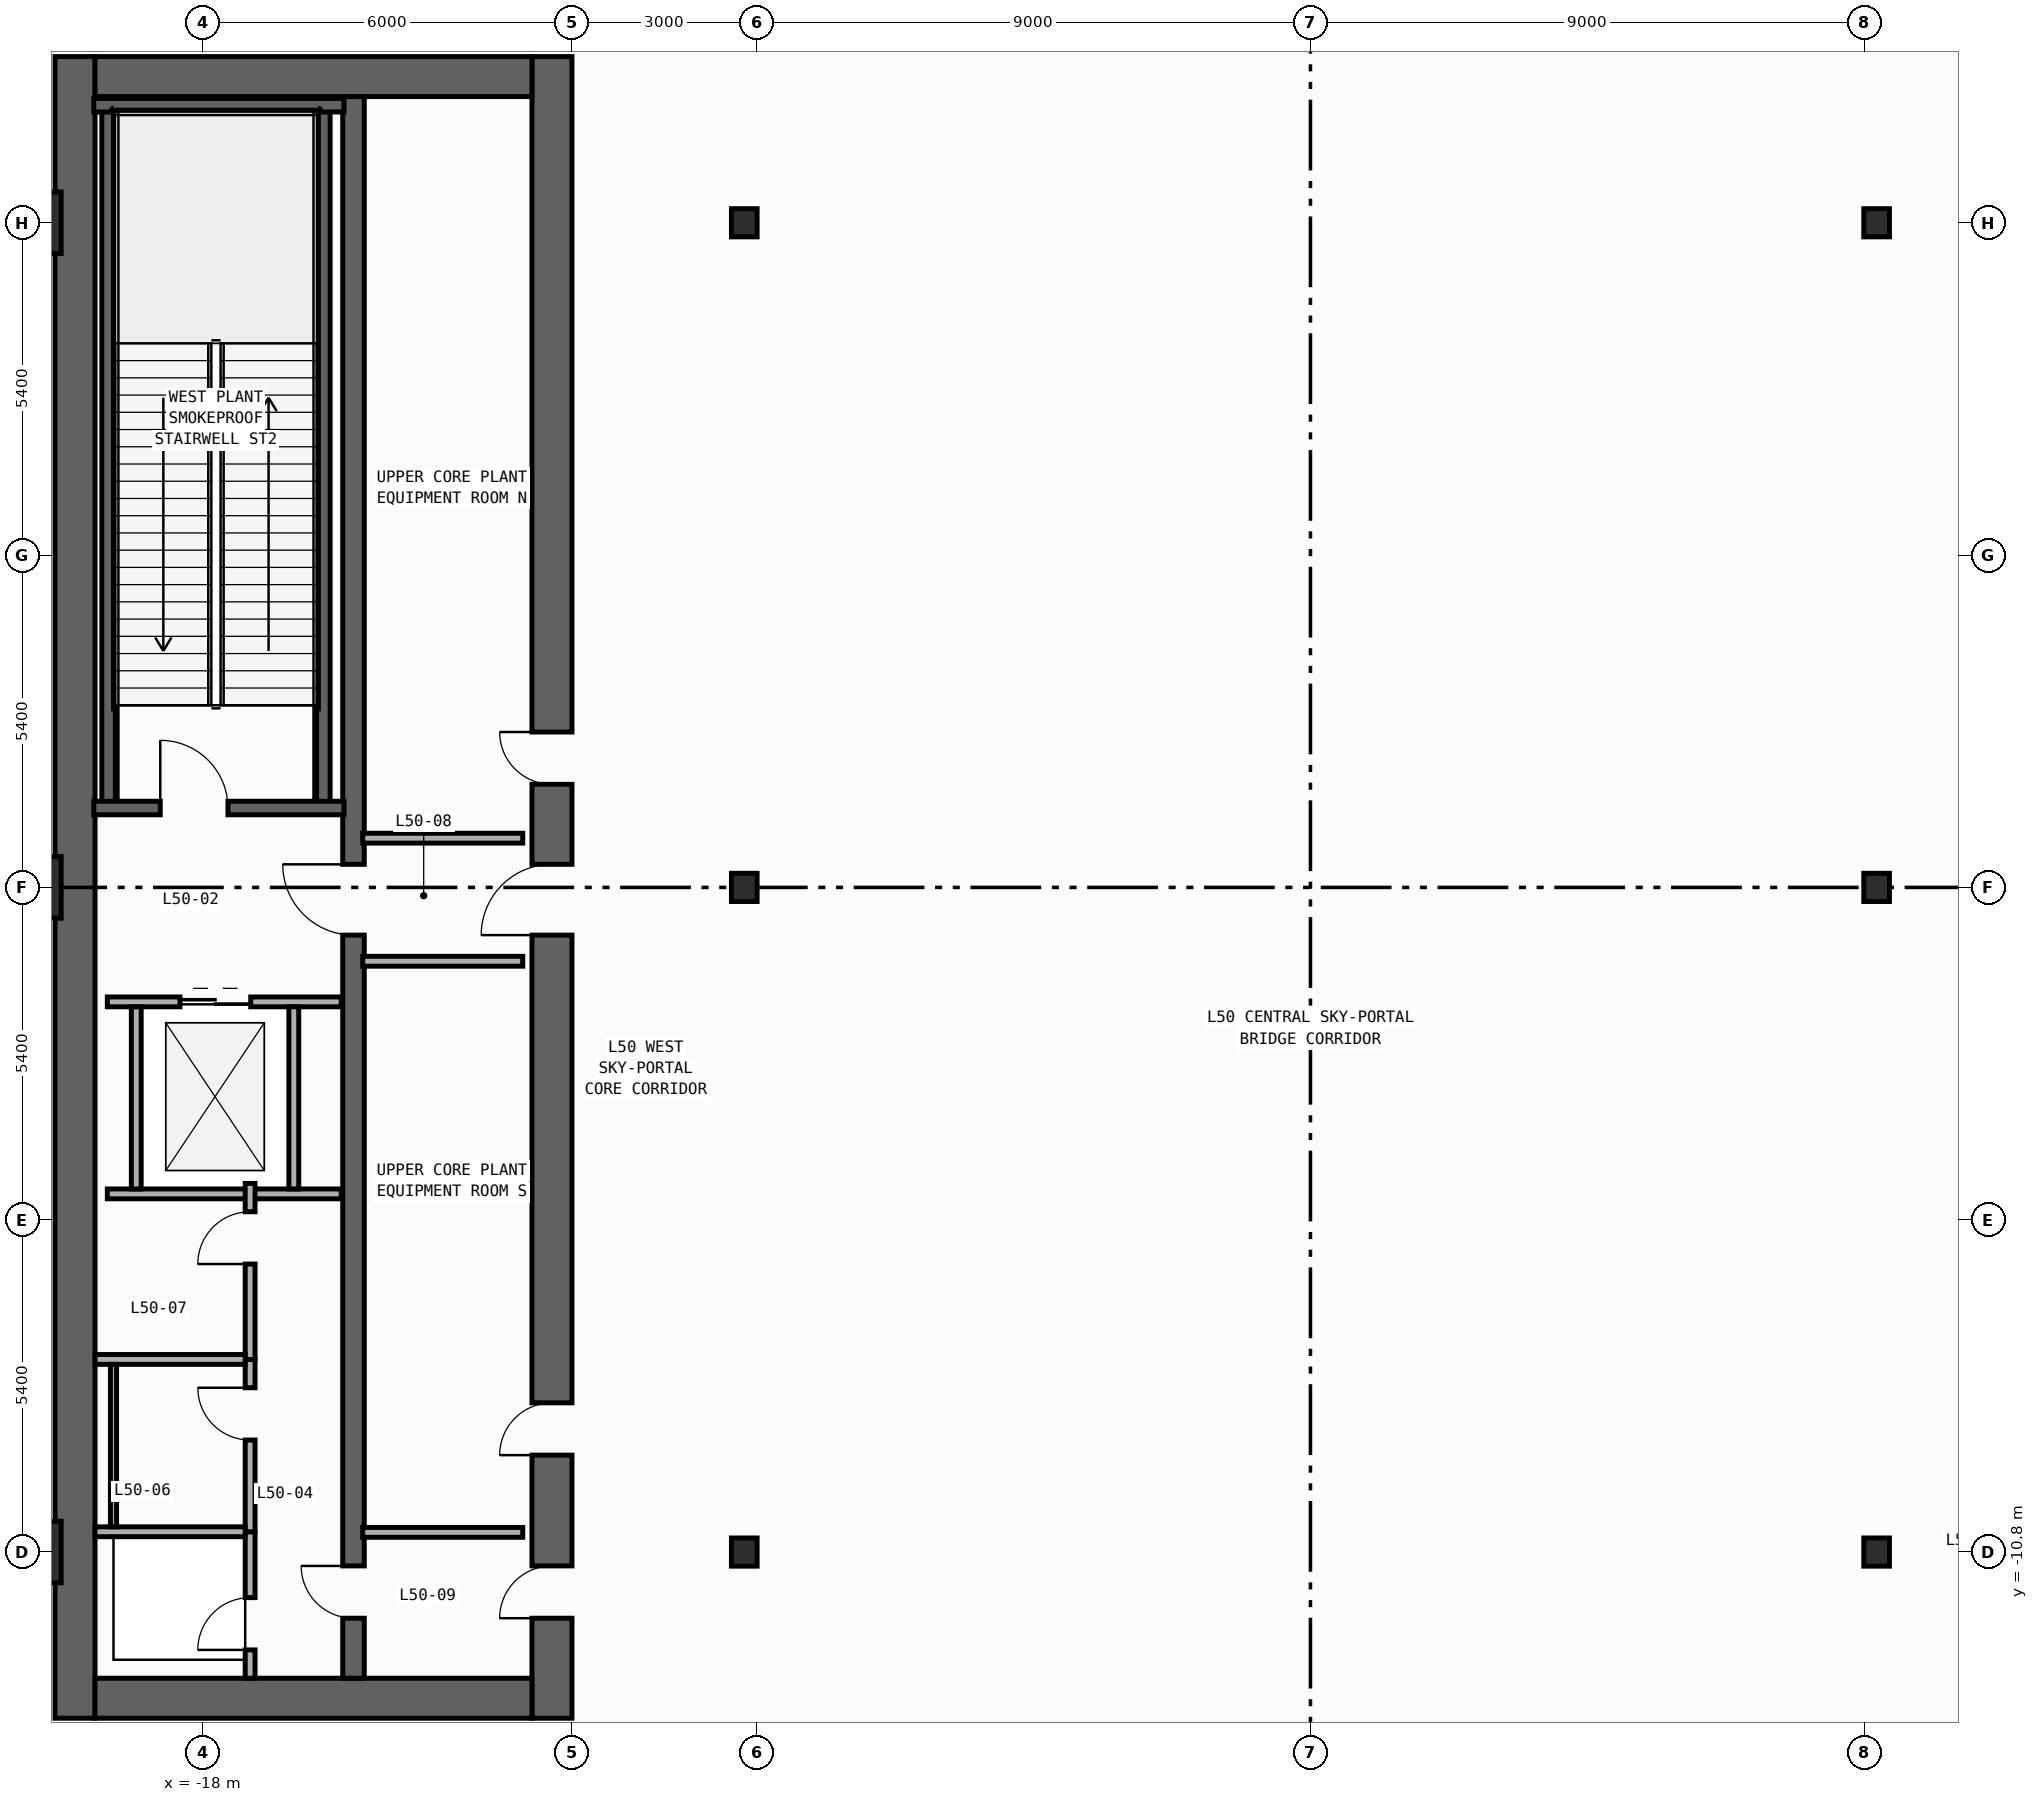
"""IFC4 building model, lengths in metres.
Left out: names, types, materials, properties, quantities, classifications, styles, units other than length and angle.
Written with IfcOpenShell. Run it as: python <this file> out.ifc"""

import sys

from ifc_helpers import new_model, si_unit, direction, frame, frame_2d, origin, origin_2d, place, context, subcontext, project, spatial, rectangle, i_section, extrude, element, fill, save


model = new_model("IFC4")
c1 = context("Model", 3, precision=1e-05, world=origin(), true_north=direction((0.0, 1.0)))
c2 = subcontext(c1, "Body", "Model", "MODEL_VIEW")
j1 = project(units=[si_unit("LENGTHUNIT", "METRE"), si_unit("PLANEANGLEUNIT", "RADIAN")], contexts=[c1])
p1 = place(None, origin())
s1 = spatial("IfcSite", under=j1, at=p1, CompositionType="ELEMENT")
p2 = place(p1, origin())
s2 = spatial("IfcBuilding", under=s1, at=p2, CompositionType="ELEMENT")
p3 = place(p2, frame((0.0, 0.0, 214.4)))
s3 = spatial("IfcBuildingStorey", under=s2, at=p3, CompositionType="ELEMENT", Elevation=214.4)
p4 = place(p3, frame((-20.075, -13.5, 0.0), z_axis=(0.0, 0.0, 1.0), x_axis=(0.0, 1.0, 0.0)))
e1 = element("IfcWall", 1, at=p4, inside=s3, PredefinedType="SHEAR", context=c2, shape_type="SweptSolid", body=[
    extrude(rectangle(XDim=27.0, YDim=0.65, at=frame_2d((13.5, 0.0))), origin(), (0.0, 0.0, 1.0), 7.74),
])
p5 = place(p3, frame((-12.325, -13.5, 0.0), z_axis=(0.0, 0.0, 1.0), x_axis=(0.0, 1.0, 0.0)))
e2 = element("IfcWall", 2, at=p5, inside=s3, PredefinedType="SHEAR", context=c2, shape_type="SweptSolid", body=[
    extrude(rectangle(XDim=27.0, YDim=0.65, at=frame_2d((13.5, 0.0))), origin(), (0.0, 0.0, 1.0), 7.74),
])
p6 = place(p5, frame((15.175, 0.0, 0.0)))
e3 = element("IfcOpeningElement", 3, at=p6, cuts=e2, PredefinedType="OPENING", context=c2, shape_type="SweptSolid", body=[
    extrude(rectangle(XDim=0.85, YDim=2.1, at=frame_2d((0.425, 1.05))), frame((0.0, 0.335, 0.0), z_axis=(0.0, -1.0, 0.0), x_axis=(1.0, 0.0, 0.0)), (0.0, 0.0, 1.0), 0.67),
])
p7 = place(p5, frame((4.275, 0.0, 0.0)))
e4 = element("IfcOpeningElement", 4, at=p7, cuts=e2, PredefinedType="OPENING", context=c2, shape_type="SweptSolid", body=[
    extrude(rectangle(XDim=0.85, YDim=2.1, at=frame_2d((0.425, 1.05))), frame((0.0, 0.335, 0.0), z_axis=(0.0, -1.0, 0.0), x_axis=(1.0, 0.0, 0.0)), (0.0, 0.0, 1.0), 0.67),
])
p8 = place(p5, frame((12.725, 0.0, 0.0)))
e5 = element("IfcOpeningElement", 5, at=p8, cuts=e2, PredefinedType="OPENING", context=c2, shape_type="SweptSolid", body=[
    extrude(rectangle(XDim=1.15, YDim=2.2, at=frame_2d((0.575, 1.1))), frame((0.0, 0.335, 0.0), z_axis=(0.0, -1.0, 0.0), x_axis=(1.0, 0.0, 0.0)), (0.0, 0.0, 1.0), 0.67),
])
p9 = place(p5, frame((1.625, 0.0, 0.0)))
e6 = element("IfcOpeningElement", 6, at=p9, cuts=e2, PredefinedType="OPENING", context=c2, shape_type="SweptSolid", body=[
    extrude(rectangle(XDim=0.85, YDim=2.1, at=frame_2d((0.425, 1.05))), frame((0.0, 0.335, 0.0), z_axis=(0.0, -1.0, 0.0), x_axis=(1.0, 0.0, 0.0)), (0.0, 0.0, 1.0), 0.67),
])
for number, where, z_axis, x_axis in (
    (7, (-19.75, -13.175, 0.0), (0.0, 0.0, 1.0), (1.0, 0.0, 0.0)),
    (8, (-19.75, 13.175, 0.0), (0.0, 0.0, 1.0), (1.0, 0.0, 0.0)),
):
    element("IfcWall", number, at=place(p3, frame(where, z_axis=z_axis, x_axis=x_axis)), inside=s3, PredefinedType="SHEAR", context=c2, shape_type="SweptSolid", body=[
        extrude(rectangle(XDim=7.1, YDim=0.65, at=frame_2d((3.55, 0.0))), origin(), (0.0, 0.0, 1.0), 7.74),
    ])
p10 = place(p3, frame((-15.55, -12.85, 0.0), z_axis=(0.0, 0.0, 1.0), x_axis=(0.0, 1.0, 0.0)))
e9 = element("IfcWall", 9, at=p10, inside=s3, PredefinedType="SHEAR", context=c2, shape_type="SweptSolid", body=[
    extrude(rectangle(XDim=25.7, YDim=0.35, at=frame_2d((12.85, 0.0))), origin(), (0.0, 0.0, 1.0), 7.74),
])
p11 = place(p10, frame((12.075, 0.0, 0.0)))
e10 = element("IfcOpeningElement", 10, at=p11, cuts=e9, PredefinedType="OPENING", context=c2, shape_type="SweptSolid", body=[
    extrude(rectangle(XDim=1.15, YDim=2.2, at=frame_2d((0.575, 1.1))), frame((0.0, 0.185, 0.0), z_axis=(0.0, -1.0, 0.0), x_axis=(1.0, 0.0, 0.0)), (0.0, 0.0, 1.0), 0.37),
])
p12 = place(p10, frame((0.975, 0.0, 0.0)))
e11 = element("IfcOpeningElement", 11, at=p12, cuts=e9, PredefinedType="OPENING", context=c2, shape_type="SweptSolid", body=[
    extrude(rectangle(XDim=0.85, YDim=2.1, at=frame_2d((0.425, 1.05))), frame((0.0, 0.185, 0.0), z_axis=(0.0, -1.0, 0.0), x_axis=(1.0, 0.0, 0.0)), (0.0, 0.0, 1.0), 0.37),
])
for number, where, z_axis, x_axis in (
    (12, (-16.04, 1.29, 0.0), (0.0, 0.0, 1.0), (0.0, 1.0, 0.0)),
    (13, (-19.53, 1.29, 0.0), (0.0, 0.0, 1.0), (0.0, 1.0, 0.0)),
):
    element("IfcWall", number, at=place(p3, frame(where, z_axis=z_axis, x_axis=x_axis)), inside=s3, PredefinedType="SHEAR", context=c2, shape_type="SweptSolid", body=[
        extrude(rectangle(XDim=11.42, YDim=0.22, at=frame_2d((5.71, 0.0))), origin(), (0.0, 0.0, 1.0), 7.74),
    ])
p13 = place(p3, frame((-19.77, 12.71, 0.0), z_axis=(0.0, 0.0, 1.0), x_axis=(1.0, 0.0, 0.0)))
e14 = element("IfcWall", 14, at=p13, inside=s3, PredefinedType="SHEAR", context=c2, shape_type="SweptSolid", body=[
    extrude(rectangle(XDim=4.065, YDim=0.22, at=frame_2d((2.032, 0.0))), origin(), (0.0, 0.0, 1.0), 7.74),
])
p14 = place(p3, frame((-19.77, 1.29, 0.0), z_axis=(0.0, 0.0, 1.0), x_axis=(1.0, 0.0, 0.0)))
e15 = element("IfcWall", 15, at=p14, inside=s3, PredefinedType="SHEAR", context=c2, shape_type="SweptSolid", body=[
    extrude(rectangle(XDim=4.065, YDim=0.22, at=frame_2d((2.032, 0.0))), origin(), (0.0, 0.0, 1.0), 7.74),
])
p15 = place(p14, frame((1.08, 0.0, 0.0)))
e16 = element("IfcOpeningElement", 16, at=p15, cuts=e15, PredefinedType="OPENING", context=c2, shape_type="SweptSolid", body=[
    extrude(rectangle(XDim=1.1, YDim=2.2, at=frame_2d((0.55, 1.1))), frame((0.0, 0.12, 0.0), z_axis=(0.0, -1.0, 0.0), x_axis=(1.0, 0.0, 0.0)), (0.0, 0.0, 1.0), 0.24),
])
for number, where, z_axis, x_axis in (
    (17, (-9.2, -10.8, 0.0), (0.0, 0.0, 1.0), (1.0, 0.0, 0.0)),
    (18, (-9.2, 0.0, 0.0), (0.0, 0.0, 1.0), (1.0, 0.0, 0.0)),
    (19, (-9.2, 10.8, 0.0), (0.0, 0.0, 1.0), (1.0, 0.0, 0.0)),
    (20, (9.2, -10.8, 0.0), (0.0, 0.0, 1.0), (1.0, 0.0, 0.0)),
    (21, (9.2, 0.0, 0.0), (0.0, 0.0, 1.0), (1.0, 0.0, 0.0)),
    (22, (9.2, 10.8, 0.0), (0.0, 0.0, 1.0), (1.0, 0.0, 0.0)),
):
    element("IfcColumn", number, at=place(p3, frame(where, z_axis=z_axis, x_axis=x_axis)), inside=s3, PredefinedType="COLUMN", context=c2, shape_type="SweptSolid", body=[
        extrude(i_section(OverallWidth=0.417, OverallDepth=0.458, WebThickness=0.03, FlangeThickness=0.05, FilletRadius=0.022, at=origin_2d()), origin(), (0.0, 0.0, 1.0), 8.0),
    ])
for number, where, z_axis, x_axis in (
    (23, (-20.8, -10.8, 0.0), (0.0, 0.0, 1.0), (1.0, 0.0, 0.0)),
    (24, (-20.8, 0.0, 0.0), (0.0, 0.0, 1.0), (1.0, 0.0, 0.0)),
    (25, (-20.8, 10.8, 0.0), (0.0, 0.0, 1.0), (1.0, 0.0, 0.0)),
):
    element("IfcColumn", number, at=place(p3, frame(where, z_axis=z_axis, x_axis=x_axis)), inside=s3, PredefinedType="COLUMN", context=c2, shape_type="SweptSolid", body=[
        extrude(rectangle(XDim=1.0, YDim=1.0, at=origin_2d()), origin(), (0.0, 0.0, 1.0), 8.0),
    ])
p16 = place(p3, frame((-19.55, -1.86, 0.0), z_axis=(0.0, 0.0, 1.0), x_axis=(1.0, 0.0, 0.0)))
e26 = element("IfcWall", 26, at=p16, inside=s3, PredefinedType="STANDARD", context=c2, shape_type="SweptSolid", body=[
    extrude(rectangle(XDim=3.8, YDim=0.16, at=frame_2d((1.9, 0.0))), origin(), (0.0, 0.0, 1.0), 7.74),
])
p17 = place(p16, frame((1.18, 0.0, 0.0)))
e27 = element("IfcOpeningElement", 27, at=p17, cuts=e26, PredefinedType="OPENING", context=c2, shape_type="SweptSolid", body=[
    extrude(rectangle(XDim=1.15, YDim=2.2, at=frame_2d((0.575, 1.1))), frame((0.0, 0.09, 0.0), z_axis=(0.0, -1.0, 0.0), x_axis=(1.0, 0.0, 0.0)), (0.0, 0.0, 1.0), 0.18),
])
p18 = place(p3, frame((-19.55, -4.98, 0.0), z_axis=(0.0, 0.0, 1.0), x_axis=(1.0, 0.0, 0.0)))
e28 = element("IfcWall", 28, at=p18, inside=s3, PredefinedType="STANDARD", context=c2, shape_type="SweptSolid", body=[
    extrude(rectangle(XDim=3.8, YDim=0.16, at=frame_2d((1.9, 0.0))), origin(), (0.0, 0.0, 1.0), 7.74),
])
for number, where, z_axis, x_axis in (
    (29, (-19.08, -4.9, 0.0), (0.0, 0.0, 1.0), (0.0, 1.0, 0.0)),
    (30, (-16.52, -4.9, 0.0), (0.0, 0.0, 1.0), (0.0, 1.0, 0.0)),
):
    element("IfcWall", number, at=place(p3, frame(where, z_axis=z_axis, x_axis=x_axis)), inside=s3, PredefinedType="STANDARD", context=c2, shape_type="SweptSolid", body=[
        extrude(rectangle(XDim=2.96, YDim=0.16, at=frame_2d((1.48, 0.0))), origin(), (0.0, 0.0, 1.0), 7.74),
    ])
for number, where, z_axis, x_axis in (
    (31, (-15.4, 0.8, 0.0), (0.0, 0.0, 1.0), (1.0, 0.0, 0.0)),
    (32, (-15.4, -1.2, 0.0), (0.0, 0.0, 1.0), (1.0, 0.0, 0.0)),
    (33, (-15.4, -10.48, 0.0), (0.0, 0.0, 1.0), (1.0, 0.0, 0.0)),
):
    element("IfcWall", number, at=place(p3, frame(where, z_axis=z_axis, x_axis=x_axis)), inside=s3, PredefinedType="STANDARD", context=c2, shape_type="SweptSolid", body=[
        extrude(rectangle(XDim=2.6, YDim=0.16, at=frame_2d((1.3, 0.0))), origin(), (0.0, 0.0, 1.0), 7.74),
    ])
p19 = place(p3, frame((-17.23, -12.85, 0.0), z_axis=(0.0, 0.0, 1.0), x_axis=(0.0, 1.0, 0.0)))
e34 = element("IfcWall", 34, at=p19, inside=s3, PredefinedType="PARTITIONING", context=c2, shape_type="SweptSolid", body=[
    extrude(rectangle(XDim=2.38, YDim=0.16, at=frame_2d((1.19, 0.0))), origin(), (0.0, 0.0, 1.0), 7.74),
])
p20 = place(p19, frame((0.46, 0.0, 0.0)))
e35 = element("IfcOpeningElement", 35, at=p20, cuts=e34, PredefinedType="OPENING", context=c2, shape_type="SweptSolid", body=[
    extrude(rectangle(XDim=0.85, YDim=2.1, at=frame_2d((0.425, 1.05))), frame((0.0, 0.09, 0.0), z_axis=(0.0, -1.0, 0.0), x_axis=(1.0, 0.0, 0.0)), (0.0, 0.0, 1.0), 0.18),
])
p21 = place(p3, frame((-17.23, -10.47, 0.0), z_axis=(0.0, 0.0, 1.0), x_axis=(0.0, 1.0, 0.0)))
e36 = element("IfcWall", 36, at=p21, inside=s3, PredefinedType="PARTITIONING", context=c2, shape_type="SweptSolid", body=[
    extrude(rectangle(XDim=2.8, YDim=0.16, at=frame_2d((1.4, 0.0))), origin(), (0.0, 0.0, 1.0), 7.74),
])
p22 = place(p21, frame((1.49, 0.0, 0.0)))
e37 = element("IfcOpeningElement", 37, at=p22, cuts=e36, PredefinedType="OPENING", context=c2, shape_type="SweptSolid", body=[
    extrude(rectangle(XDim=0.85, YDim=2.1, at=frame_2d((0.425, 1.05))), frame((0.0, 0.09, 0.0), z_axis=(0.0, -1.0, 0.0), x_axis=(1.0, 0.0, 0.0)), (0.0, 0.0, 1.0), 0.18),
])
p23 = place(p3, frame((-17.23, -7.67, 0.0), z_axis=(0.0, 0.0, 1.0), x_axis=(0.0, 1.0, 0.0)))
e38 = element("IfcWall", 38, at=p23, inside=s3, PredefinedType="PARTITIONING", context=c2, shape_type="SweptSolid", body=[
    extrude(rectangle(XDim=2.86, YDim=0.16, at=frame_2d((1.43, 0.0))), origin(), (0.0, 0.0, 1.0), 7.74),
])
p24 = place(p23, frame((1.55, 0.0, 0.0)))
e39 = element("IfcOpeningElement", 39, at=p24, cuts=e38, PredefinedType="OPENING", context=c2, shape_type="SweptSolid", body=[
    extrude(rectangle(XDim=0.85, YDim=2.1, at=frame_2d((0.425, 1.05))), frame((0.0, 0.09, 0.0), z_axis=(0.0, -1.0, 0.0), x_axis=(1.0, 0.0, 0.0)), (0.0, 0.0, 1.0), 0.18),
])
for number, where, z_axis, x_axis in (
    (40, (-19.75, -10.47, 0.0), (0.0, 0.0, 1.0), (1.0, 0.0, 0.0)),
    (41, (-19.75, -7.67, 0.0), (0.0, 0.0, 1.0), (1.0, 0.0, 0.0)),
):
    element("IfcWall", number, at=place(p3, frame(where, z_axis=z_axis, x_axis=x_axis)), inside=s3, PredefinedType="PARTITIONING", context=c2, shape_type="SweptSolid", body=[
        extrude(rectangle(XDim=2.44, YDim=0.16, at=frame_2d((1.22, 0.0))), origin(), (0.0, 0.0, 1.0), 7.74),
    ])
p25 = place(p3, frame((-19.45, -10.39, 0.0), z_axis=(0.0, 0.0, 1.0), x_axis=(0.0, 1.0, 0.0)))
e42 = element("IfcWall", 42, at=p25, inside=s3, PredefinedType="PARTITIONING", context=c2, shape_type="SweptSolid", body=[
    extrude(rectangle(XDim=2.64, YDim=0.1, at=frame_2d((1.32, 0.0))), origin(), (0.0, 0.0, 1.0), 7.74),
])
p26 = place(p15, origin())
e43 = element("IfcDoor", 43, at=p26, inside=s3, OperationType="SINGLE_SWING_LEFT", PredefinedType="DOOR", context=c2, shape_type="SweptSolid", body=[
    extrude(rectangle(XDim=1.1, YDim=2.2, at=frame_2d((0.55, 1.1))), frame((0.0, 0.025, 0.0), z_axis=(0.0, -1.0, 0.0), x_axis=(1.0, 0.0, 0.0)), (0.0, 0.0, 1.0), 0.05),
])
fill(e16, e43)
p27 = place(p6, origin())
e44 = element("IfcDoor", 44, at=p27, inside=s3, OperationType="SINGLE_SWING_RIGHT", PredefinedType="DOOR", context=c2, shape_type="SweptSolid", body=[
    extrude(rectangle(XDim=0.85, YDim=2.1, at=frame_2d((0.425, 1.05))), frame((0.0, 0.025, 0.0), z_axis=(0.0, -1.0, 0.0), x_axis=(1.0, 0.0, 0.0)), (0.0, 0.0, 1.0), 0.05),
])
fill(e3, e44)
p28 = place(p7, origin())
e45 = element("IfcDoor", 45, at=p28, inside=s3, OperationType="SINGLE_SWING_LEFT", PredefinedType="DOOR", context=c2, shape_type="SweptSolid", body=[
    extrude(rectangle(XDim=0.85, YDim=2.1, at=frame_2d((0.425, 1.05))), frame((0.0, 0.025, 0.0), z_axis=(0.0, -1.0, 0.0), x_axis=(1.0, 0.0, 0.0)), (0.0, 0.0, 1.0), 0.05),
])
fill(e4, e45)
p29 = place(p8, origin())
e46 = element("IfcDoor", 46, at=p29, inside=s3, OperationType="SINGLE_SWING_LEFT", PredefinedType="DOOR", context=c2, shape_type="SweptSolid", body=[
    extrude(rectangle(XDim=1.15, YDim=2.2, at=frame_2d((0.575, 1.1))), frame((0.0, 0.025, 0.0), z_axis=(0.0, -1.0, 0.0), x_axis=(1.0, 0.0, 0.0)), (0.0, 0.0, 1.0), 0.05),
])
fill(e5, e46)
p30 = place(p11, origin())
e47 = element("IfcDoor", 47, at=p30, inside=s3, OperationType="SINGLE_SWING_RIGHT", PredefinedType="DOOR", context=c2, shape_type="SweptSolid", body=[
    extrude(rectangle(XDim=1.15, YDim=2.2, at=frame_2d((0.575, 1.1))), frame((0.0, 0.025, 0.0), z_axis=(0.0, -1.0, 0.0), x_axis=(1.0, 0.0, 0.0)), (0.0, 0.0, 1.0), 0.05),
])
fill(e10, e47)
p31 = place(p9, origin())
e48 = element("IfcDoor", 48, at=p31, inside=s3, OperationType="SINGLE_SWING_LEFT", PredefinedType="DOOR", context=c2, shape_type="SweptSolid", body=[
    extrude(rectangle(XDim=0.85, YDim=2.1, at=frame_2d((0.425, 1.05))), frame((0.0, 0.025, 0.0), z_axis=(0.0, -1.0, 0.0), x_axis=(1.0, 0.0, 0.0)), (0.0, 0.0, 1.0), 0.05),
])
fill(e6, e48)
p32 = place(p12, origin())
e49 = element("IfcDoor", 49, at=p32, inside=s3, OperationType="SINGLE_SWING_RIGHT", PredefinedType="DOOR", context=c2, shape_type="SweptSolid", body=[
    extrude(rectangle(XDim=0.85, YDim=2.1, at=frame_2d((0.425, 1.05))), frame((0.0, 0.025, 0.0), z_axis=(0.0, -1.0, 0.0), x_axis=(1.0, 0.0, 0.0)), (0.0, 0.0, 1.0), 0.05),
])
fill(e11, e49)
p33 = place(p17, origin())
e50 = element("IfcDoor", 50, at=p33, inside=s3, OperationType="DOUBLE_DOOR_SLIDING", PredefinedType="DOOR", context=c2, shape_type="SweptSolid", body=[
    extrude(rectangle(XDim=1.15, YDim=2.2, at=frame_2d((0.575, 1.1))), frame((0.0, 0.025, 0.0), z_axis=(0.0, -1.0, 0.0), x_axis=(1.0, 0.0, 0.0)), (0.0, 0.0, 1.0), 0.05),
])
fill(e27, e50)
p34 = place(p20, origin())
e51 = element("IfcDoor", 51, at=p34, inside=s3, OperationType="SINGLE_SWING_LEFT", PredefinedType="DOOR", context=c2, shape_type="SweptSolid", body=[
    extrude(rectangle(XDim=0.85, YDim=2.1, at=frame_2d((0.425, 1.05))), frame((0.0, 0.025, 0.0), z_axis=(0.0, -1.0, 0.0), x_axis=(1.0, 0.0, 0.0)), (0.0, 0.0, 1.0), 0.05),
])
fill(e35, e51)
p35 = place(p22, origin())
e52 = element("IfcDoor", 52, at=p35, inside=s3, OperationType="SINGLE_SWING_RIGHT", PredefinedType="DOOR", context=c2, shape_type="SweptSolid", body=[
    extrude(rectangle(XDim=0.85, YDim=2.1, at=frame_2d((0.425, 1.05))), frame((0.0, 0.025, 0.0), z_axis=(0.0, -1.0, 0.0), x_axis=(1.0, 0.0, 0.0)), (0.0, 0.0, 1.0), 0.05),
])
fill(e37, e52)
p36 = place(p24, origin())
e53 = element("IfcDoor", 53, at=p36, inside=s3, OperationType="SINGLE_SWING_LEFT", PredefinedType="DOOR", context=c2, shape_type="SweptSolid", body=[
    extrude(rectangle(XDim=0.85, YDim=2.1, at=frame_2d((0.425, 1.05))), frame((0.0, 0.025, 0.0), z_axis=(0.0, -1.0, 0.0), x_axis=(1.0, 0.0, 0.0)), (0.0, 0.0, 1.0), 0.05),
])
fill(e39, e53)
save(model, sys.argv[1])
